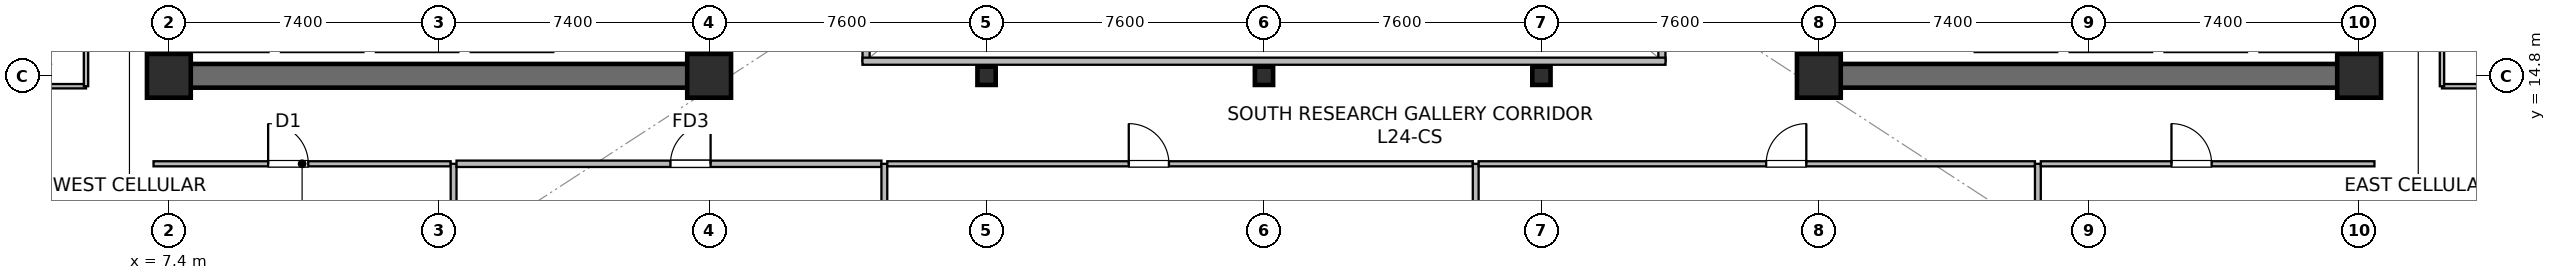
"""IFC4 building model, lengths in metres.
Left out: names, types, materials, properties, quantities, classifications, styles, units other than length and angle.
Written with IfcOpenShell. Run it as: python <this file> out.ifc"""

import sys

from ifc_helpers import new_model, si_unit, direction, frame, frame_2d, origin, origin_2d, place, context, subcontext, project, spatial, rectangle, hollow_rectangle, extrude, source, transform, mapped, element, fill, save


model = new_model("IFC4")
c1 = context("Model", 3, precision=1e-05, world=origin(), true_north=direction((0.0, 1.0)))
c2 = subcontext(c1, "Body", "Model", "MODEL_VIEW")
j1 = project(units=[si_unit("LENGTHUNIT", "METRE"), si_unit("PLANEANGLEUNIT", "RADIAN")], contexts=[c1])
p1 = place(None, origin())
s1 = spatial("IfcSite", under=j1, at=p1, CompositionType="ELEMENT")
p2 = place(p1, origin())
s2 = spatial("IfcBuilding", under=s1, at=p2, CompositionType="ELEMENT")
p3 = place(p2, frame((0.0, 0.0, 100.3)))
s3 = spatial("IfcBuildingStorey", under=s2, at=p3, CompositionType="ELEMENT", Elevation=100.3)
p4 = place(p3, frame((7.075, 14.8, 0.0), z_axis=(0.0, 0.0, 1.0), x_axis=(1.0, 0.0, 0.0)))
e1 = element("IfcWall", 1, at=p4, inside=s3, PredefinedType="SHEAR", context=c2, shape_type="SweptSolid", body=[
    extrude(rectangle(XDim=15.45, YDim=0.65, at=frame_2d((7.725, 0.0))), origin(), (0.0, 0.0, 1.0), 4.49),
])
p5 = place(p3, frame((7.4, 15.125, 0.0), z_axis=(0.0, 0.0, 1.0), x_axis=(0.0, 1.0, 0.0)))
e2 = element("IfcWall", 2, at=p5, inside=s3, PredefinedType="SHEAR", context=c2, shape_type="SweptSolid", body=[
    extrude(rectangle(XDim=18.35, YDim=0.65, at=frame_2d((9.175, 0.0))), origin(), (0.0, 0.0, 1.0), 4.49),
])
p6 = place(p3, frame((22.2, 15.125, 0.0), z_axis=(0.0, 0.0, 1.0), x_axis=(0.0, 1.0, 0.0)))
e3 = element("IfcWall", 3, at=p6, inside=s3, PredefinedType="SHEAR", context=c2, shape_type="SweptSolid", body=[
    extrude(rectangle(XDim=18.35, YDim=0.65, at=frame_2d((9.175, 0.0))), origin(), (0.0, 0.0, 1.0), 4.49),
])
p7 = place(p6, frame((3.425, 0.0, 0.0)))
e4 = element("IfcOpeningElement", 4, at=p7, cuts=e3, PredefinedType="OPENING", context=c2, shape_type="SweptSolid", body=[
    extrude(rectangle(XDim=1.42, YDim=2.2, at=frame_2d((0.71, 1.1))), frame((0.0, 0.335, 0.0), z_axis=(0.0, -1.0, 0.0), x_axis=(1.0, 0.0, 0.0)), (0.0, 0.0, 1.0), 0.67),
])
p8 = place(p3, frame((52.275, 14.8, 0.0), z_axis=(0.0, 0.0, 1.0), x_axis=(1.0, 0.0, 0.0)))
e5 = element("IfcWall", 5, at=p8, inside=s3, PredefinedType="SHEAR", context=c2, shape_type="SweptSolid", body=[
    extrude(rectangle(XDim=15.45, YDim=0.65, at=frame_2d((7.725, 0.0))), origin(), (0.0, 0.0, 1.0), 4.49),
])
p9 = place(p3, frame((52.6, 15.125, 0.0), z_axis=(0.0, 0.0, 1.0), x_axis=(0.0, 1.0, 0.0)))
e6 = element("IfcWall", 6, at=p9, inside=s3, PredefinedType="SHEAR", context=c2, shape_type="SweptSolid", body=[
    extrude(rectangle(XDim=18.35, YDim=0.65, at=frame_2d((9.175, 0.0))), origin(), (0.0, 0.0, 1.0), 4.49),
])
p10 = place(p9, frame((3.425, 0.0, 0.0)))
e7 = element("IfcOpeningElement", 7, at=p10, cuts=e6, PredefinedType="OPENING", context=c2, shape_type="SweptSolid", body=[
    extrude(rectangle(XDim=1.42, YDim=2.2, at=frame_2d((0.71, 1.1))), frame((0.0, 0.335, 0.0), z_axis=(0.0, -1.0, 0.0), x_axis=(1.0, 0.0, 0.0)), (0.0, 0.0, 1.0), 0.67),
])
p11 = place(p3, frame((67.4, 15.125, 0.0), z_axis=(0.0, 0.0, 1.0), x_axis=(0.0, 1.0, 0.0)))
e8 = element("IfcWall", 8, at=p11, inside=s3, PredefinedType="SHEAR", context=c2, shape_type="SweptSolid", body=[
    extrude(rectangle(XDim=18.35, YDim=0.65, at=frame_2d((9.175, 0.0))), origin(), (0.0, 0.0, 1.0), 4.49),
])
m1 = source(origin(), c2, "Body", "SweptSolid", [
    extrude(rectangle(XDim=1.2, YDim=1.2, at=origin_2d()), origin(), (0.0, 0.0, 1.0), 4.8),
])
for number, where, z_axis, x_axis in (
    (9, (7.4, 14.8, 0.0), (0.0, 0.0, 1.0), (1.0, 0.0, 0.0)),
    (10, (22.2, 14.8, 0.0), (0.0, 0.0, 1.0), (1.0, 0.0, 0.0)),
    (11, (52.6, 14.8, 0.0), (0.0, 0.0, 1.0), (1.0, 0.0, 0.0)),
    (12, (67.4, 14.8, 0.0), (0.0, 0.0, 1.0), (1.0, 0.0, 0.0)),
):
    element("IfcColumn", number, at=place(p3, frame(where, z_axis=z_axis, x_axis=x_axis)), inside=s3, PredefinedType="COLUMN", context=c2, shape_type="MappedRepresentation", body=[
        mapped(m1, transform((0.0, 0.0, 0.0), scale=1.0)),
    ])
m2 = source(origin(), c2, "Body", "SweptSolid", [
    extrude(hollow_rectangle(XDim=0.5, YDim=0.5, WallThickness=0.022, at=origin_2d()), origin(), (0.0, 0.0, 1.0), 4.8),
])
for number, where, z_axis, x_axis in (
    (13, (29.8, 14.8, 0.0), (0.0, 0.0, 1.0), (1.0, 0.0, 0.0)),
    (14, (37.4, 14.8, 0.0), (0.0, 0.0, 1.0), (1.0, 0.0, 0.0)),
    (15, (45.0, 14.8, 0.0), (0.0, 0.0, 1.0), (1.0, 0.0, 0.0)),
):
    element("IfcColumn", number, at=place(p3, frame(where, z_axis=z_axis, x_axis=x_axis)), inside=s3, PredefinedType="COLUMN", context=c2, shape_type="MappedRepresentation", body=[
        mapped(m2, transform((0.0, 0.0, 0.0), scale=1.0)),
    ])
p12 = place(p3, frame((7.87, 15.55, 0.0), z_axis=(0.0, 0.0, 1.0), x_axis=(1.0, 0.0, 0.0)))
e16 = element("IfcWall", 16, at=p12, inside=s3, PredefinedType="SOLIDWALL", context=c2, shape_type="SweptSolid", body=[
    extrude(rectangle(XDim=2.26, YDim=0.2, at=frame_2d((1.13, 0.0))), origin(), (0.0, 0.0, 1.0), 4.49),
])
p13 = place(p3, frame((10.47, 15.55, 0.0), z_axis=(0.0, 0.0, 1.0), x_axis=(1.0, 0.0, 0.0)))
e17 = element("IfcWall", 17, at=p13, inside=s3, PredefinedType="SOLIDWALL", context=c2, shape_type="SweptSolid", body=[
    extrude(rectangle(XDim=2.26, YDim=0.2, at=frame_2d((1.13, 0.0))), origin(), (0.0, 0.0, 1.0), 4.49),
])
p14 = place(p3, frame((13.07, 15.55, 0.0), z_axis=(0.0, 0.0, 1.0), x_axis=(1.0, 0.0, 0.0)))
e18 = element("IfcWall", 18, at=p14, inside=s3, PredefinedType="SOLIDWALL", context=c2, shape_type="SweptSolid", body=[
    extrude(rectangle(XDim=2.26, YDim=0.2, at=frame_2d((1.13, 0.0))), origin(), (0.0, 0.0, 1.0), 3.825),
])
for number, where, z_axis, x_axis in (
    (19, (15.67, 15.55, 0.0), (0.0, 0.0, 1.0), (1.0, 0.0, 0.0)),
    (20, (64.67, 15.55, 0.0), (0.0, 0.0, 1.0), (1.0, 0.0, 0.0)),
    (21, (62.07, 15.55, 0.0), (0.0, 0.0, 1.0), (1.0, 0.0, 0.0)),
):
    element("IfcWall", number, at=place(p3, frame(where, z_axis=z_axis, x_axis=x_axis)), inside=s3, PredefinedType="SOLIDWALL", context=c2, shape_type="SweptSolid", body=[
        extrude(rectangle(XDim=2.26, YDim=0.2, at=frame_2d((1.13, 0.0))), origin(), (0.0, 0.0, 1.0), 4.49),
    ])
p15 = place(p3, frame((59.47, 15.55, 0.0), z_axis=(0.0, 0.0, 1.0), x_axis=(1.0, 0.0, 0.0)))
e22 = element("IfcWall", 22, at=p15, inside=s3, PredefinedType="SOLIDWALL", context=c2, shape_type="SweptSolid", body=[
    extrude(rectangle(XDim=2.26, YDim=0.2, at=frame_2d((1.13, 0.0))), origin(), (0.0, 0.0, 1.0), 3.825),
])
p16 = place(p3, frame((56.87, 15.55, 0.0), z_axis=(0.0, 0.0, 1.0), x_axis=(1.0, 0.0, 0.0)))
e23 = element("IfcWall", 23, at=p16, inside=s3, PredefinedType="SOLIDWALL", context=c2, shape_type="SweptSolid", body=[
    extrude(rectangle(XDim=2.26, YDim=0.2, at=frame_2d((1.13, 0.0))), origin(), (0.0, 0.0, 1.0), 4.49),
])
p17 = place(p3, frame((26.5, 15.2, 0.0), z_axis=(0.0, 0.0, 1.0), x_axis=(0.0, 1.0, 0.0)))
e24 = element("IfcWall", 24, at=p17, inside=s3, PredefinedType="SOLIDWALL", context=c2, shape_type="SweptSolid", body=[
    extrude(rectangle(XDim=18.2, YDim=0.195, at=frame_2d((9.1, 0.0))), origin(), (0.0, 0.0, 1.0), 4.49),
])
p18 = place(p17, frame((1.8, 0.0, 0.9)))
e25 = element("IfcOpeningElement", 25, at=p18, cuts=e24, PredefinedType="OPENING", context=c2, shape_type="SweptSolid", body=[
    extrude(rectangle(XDim=1.5, YDim=1.4, at=frame_2d((0.75, 0.7))), frame((0.0, 0.107, 0.0), z_axis=(0.0, -1.0, 0.0), x_axis=(1.0, 0.0, 0.0)), (0.0, 0.0, 1.0), 0.215),
])
p19 = place(p17, frame((13.2, 0.0, 0.9)))
e26 = element("IfcOpeningElement", 26, at=p19, cuts=e24, PredefinedType="OPENING", context=c2, shape_type="SweptSolid", body=[
    extrude(rectangle(XDim=1.5, YDim=1.4, at=frame_2d((0.75, 0.7))), frame((0.0, 0.107, 0.0), z_axis=(0.0, -1.0, 0.0), x_axis=(1.0, 0.0, 0.0)), (0.0, 0.0, 1.0), 0.215),
])
p20 = place(p3, frame((48.3, 15.2, 0.0), z_axis=(0.0, 0.0, 1.0), x_axis=(0.0, 1.0, 0.0)))
e27 = element("IfcWall", 27, at=p20, inside=s3, PredefinedType="SOLIDWALL", context=c2, shape_type="SweptSolid", body=[
    extrude(rectangle(XDim=18.2, YDim=0.195, at=frame_2d((9.1, 0.0))), origin(), (0.0, 0.0, 1.0), 4.49),
])
p21 = place(p20, frame((1.8, 0.0, 0.9)))
e28 = element("IfcOpeningElement", 28, at=p21, cuts=e27, PredefinedType="OPENING", context=c2, shape_type="SweptSolid", body=[
    extrude(rectangle(XDim=1.5, YDim=1.4, at=frame_2d((0.75, 0.7))), frame((0.0, 0.107, 0.0), z_axis=(0.0, -1.0, 0.0), x_axis=(1.0, 0.0, 0.0)), (0.0, 0.0, 1.0), 0.215),
])
p22 = place(p20, frame((13.2, 0.0, 0.9)))
e29 = element("IfcOpeningElement", 29, at=p22, cuts=e27, PredefinedType="OPENING", context=c2, shape_type="SweptSolid", body=[
    extrude(rectangle(XDim=1.5, YDim=1.4, at=frame_2d((0.75, 0.7))), frame((0.0, 0.107, 0.0), z_axis=(0.0, -1.0, 0.0), x_axis=(1.0, 0.0, 0.0)), (0.0, 0.0, 1.0), 0.215),
])
p23 = place(p3, frame((26.4, 15.2, 0.0), z_axis=(0.0, 0.0, 1.0), x_axis=(1.0, 0.0, 0.0)))
e30 = element("IfcWall", 30, at=p23, inside=s3, PredefinedType="SOLIDWALL", context=c2, shape_type="SweptSolid", body=[
    extrude(rectangle(XDim=22.0, YDim=0.195, at=frame_2d((11.0, 0.0))), origin(), (0.0, 0.0, 1.0), 4.49),
])
p24 = place(p3, frame((6.98, 12.39, 0.0), z_axis=(0.0, 0.0, 1.0), x_axis=(1.0, 0.0, 0.0)))
e31 = element("IfcWall", 31, at=p24, inside=s3, PredefinedType="PARTITIONING", context=c2, shape_type="SweptSolid", body=[
    extrude(rectangle(XDim=8.14, YDim=0.14, at=frame_2d((4.07, 0.0))), origin(), (0.0, 0.0, 1.0), 3.825),
])
p25 = place(p24, frame((3.14, 0.0, 0.0)))
e32 = element("IfcOpeningElement", 32, at=p25, cuts=e31, PredefinedType="OPENING", context=c2, shape_type="SweptSolid", body=[
    extrude(rectangle(XDim=1.1, YDim=2.18, at=frame_2d((0.55, 1.09))), frame((0.0, 0.08, 0.0), z_axis=(0.0, -1.0, 0.0), x_axis=(1.0, 0.0, 0.0)), (0.0, 0.0, 1.0), 0.16),
])
p26 = place(p3, frame((15.2, 1.41, 0.0), z_axis=(0.0, 0.0, 1.0), x_axis=(0.0, 1.0, 0.0)))
e33 = element("IfcWall", 33, at=p26, inside=s3, PredefinedType="PARTITIONING", context=c2, shape_type="SweptSolid", body=[
    extrude(rectangle(XDim=10.98, YDim=0.16, at=frame_2d((5.49, 0.0))), origin(), (0.0, 0.0, 1.0), 3.775),
])
p27 = place(p3, frame((15.28, 12.39, 0.0), z_axis=(0.0, 0.0, 1.0), x_axis=(1.0, 0.0, 0.0)))
e34 = element("IfcWall", 34, at=p27, inside=s3, PredefinedType="PARTITIONING", context=c2, shape_type="SweptSolid", body=[
    extrude(rectangle(XDim=11.64, YDim=0.175, at=frame_2d((5.82, 0.0))), origin(), (0.0, 0.0, 1.0), 3.825),
])
p28 = place(p27, frame((5.86, 0.0, 0.0)))
e35 = element("IfcOpeningElement", 35, at=p28, cuts=e34, PredefinedType="OPENING", context=c2, shape_type="SweptSolid", body=[
    extrude(rectangle(XDim=1.1, YDim=2.15, at=frame_2d((0.55, 1.075))), frame((0.0, 0.098, 0.0), z_axis=(0.0, -1.0, 0.0), x_axis=(1.0, 0.0, 0.0)), (0.0, 0.0, 1.0), 0.195),
])
p29 = place(p3, frame((27.0, 2.61, 0.0), z_axis=(0.0, 0.0, 1.0), x_axis=(0.0, 1.0, 0.0)))
e36 = element("IfcWall", 36, at=p29, inside=s3, PredefinedType="PARTITIONING", context=c2, shape_type="SweptSolid", body=[
    extrude(rectangle(XDim=9.78, YDim=0.16, at=frame_2d((4.89, 0.0))), origin(), (0.0, 0.0, 1.0), 3.775),
])
p30 = place(p3, frame((27.08, 12.39, 0.0), z_axis=(0.0, 0.0, 1.0), x_axis=(1.0, 0.0, 0.0)))
e37 = element("IfcWall", 37, at=p30, inside=s3, PredefinedType="PARTITIONING", context=c2, shape_type="SweptSolid", body=[
    extrude(rectangle(XDim=16.04, YDim=0.14, at=frame_2d((8.02, 0.0))), origin(), (0.0, 0.0, 1.0), 3.825),
])
p31 = place(p30, frame((6.615, 0.0, 0.0)))
e38 = element("IfcOpeningElement", 38, at=p31, cuts=e37, PredefinedType="OPENING", context=c2, shape_type="SweptSolid", body=[
    extrude(rectangle(XDim=1.1, YDim=2.18, at=frame_2d((0.55, 1.09))), frame((0.0, 0.08, 0.0), z_axis=(0.0, -1.0, 0.0), x_axis=(1.0, 0.0, 0.0)), (0.0, 0.0, 1.0), 0.16),
])
p32 = place(p3, frame((43.2, 2.61, 0.0), z_axis=(0.0, 0.0, 1.0), x_axis=(0.0, 1.0, 0.0)))
e39 = element("IfcWall", 39, at=p32, inside=s3, PredefinedType="PARTITIONING", context=c2, shape_type="SweptSolid", body=[
    extrude(rectangle(XDim=9.78, YDim=0.16, at=frame_2d((4.89, 0.0))), origin(), (0.0, 0.0, 1.0), 3.775),
])
p33 = place(p3, frame((43.28, 12.39, 0.0), z_axis=(0.0, 0.0, 1.0), x_axis=(1.0, 0.0, 0.0)))
e40 = element("IfcWall", 40, at=p33, inside=s3, PredefinedType="PARTITIONING", context=c2, shape_type="SweptSolid", body=[
    extrude(rectangle(XDim=15.24, YDim=0.14, at=frame_2d((7.62, 0.0))), origin(), (0.0, 0.0, 1.0), 3.825),
])
p34 = place(p33, frame((7.876, 0.0, 0.0)))
e41 = element("IfcOpeningElement", 41, at=p34, cuts=e40, PredefinedType="OPENING", context=c2, shape_type="SweptSolid", body=[
    extrude(rectangle(XDim=1.1, YDim=2.18, at=frame_2d((0.55, 1.09))), frame((0.0, 0.08, 0.0), z_axis=(0.0, -1.0, 0.0), x_axis=(1.0, 0.0, 0.0)), (0.0, 0.0, 1.0), 0.16),
])
p35 = place(p3, frame((58.6, 1.41, 0.0), z_axis=(0.0, 0.0, 1.0), x_axis=(0.0, 1.0, 0.0)))
e42 = element("IfcWall", 42, at=p35, inside=s3, PredefinedType="PARTITIONING", context=c2, shape_type="SweptSolid", body=[
    extrude(rectangle(XDim=10.98, YDim=0.16, at=frame_2d((5.49, 0.0))), origin(), (0.0, 0.0, 1.0), 3.775),
])
p36 = place(p3, frame((58.68, 12.39, 0.0), z_axis=(0.0, 0.0, 1.0), x_axis=(1.0, 0.0, 0.0)))
e43 = element("IfcWall", 43, at=p36, inside=s3, PredefinedType="PARTITIONING", context=c2, shape_type="SweptSolid", body=[
    extrude(rectangle(XDim=9.14, YDim=0.14, at=frame_2d((4.57, 0.0))), origin(), (0.0, 0.0, 1.0), 3.825),
])
p37 = place(p36, frame((3.58, 0.0, 0.0)))
e44 = element("IfcOpeningElement", 44, at=p37, cuts=e43, PredefinedType="OPENING", context=c2, shape_type="SweptSolid", body=[
    extrude(rectangle(XDim=1.1, YDim=2.18, at=frame_2d((0.55, 1.09))), frame((0.0, 0.08, 0.0), z_axis=(0.0, -1.0, 0.0), x_axis=(1.0, 0.0, 0.0)), (0.0, 0.0, 1.0), 0.16),
])
p38 = place(p3, frame((2.11, 14.515, 0.0), z_axis=(0.0, 0.0, 1.0), x_axis=(1.0, 0.0, 0.0)))
e45 = element("IfcWall", 45, at=p38, inside=s3, PredefinedType="PARTITIONING", context=c2, shape_type="SweptSolid", body=[
    extrude(rectangle(XDim=3.02, YDim=0.12, at=frame_2d((1.51, 0.0))), origin(), (0.0, 0.0, 1.0), 4.49),
])
p39 = place(p3, frame((5.13, 14.515, 0.0), z_axis=(0.0, 0.0, 1.0), x_axis=(0.0, 1.0, 0.0)))
e46 = element("IfcWall", 46, at=p39, inside=s3, PredefinedType="PARTITIONING", context=c2, shape_type="SweptSolid", body=[
    extrude(rectangle(XDim=11.625, YDim=0.12, at=frame_2d((5.812, 0.0))), origin(), (0.0, 0.0, 1.0), 4.49),
])
p40 = place(p39, frame((5.363, 0.0, 0.0)))
e47 = element("IfcOpeningElement", 47, at=p40, cuts=e46, PredefinedType="OPENING", context=c2, shape_type="SweptSolid", body=[
    extrude(rectangle(XDim=0.9, YDim=2.1, at=frame_2d((0.45, 1.05))), frame((0.0, 0.07, 0.0), z_axis=(0.0, -1.0, 0.0), x_axis=(1.0, 0.0, 0.0)), (0.0, 0.0, 1.0), 0.14),
])
p41 = place(p3, frame((69.67, 14.515, 0.0), z_axis=(0.0, 0.0, 1.0), x_axis=(1.0, 0.0, 0.0)))
e48 = element("IfcWall", 48, at=p41, inside=s3, PredefinedType="PARTITIONING", context=c2, shape_type="SweptSolid", body=[
    extrude(rectangle(XDim=3.02, YDim=0.12, at=frame_2d((1.51, 0.0))), origin(), (0.0, 0.0, 1.0), 4.49),
])
p42 = place(p3, frame((69.67, 14.515, 0.0), z_axis=(0.0, 0.0, 1.0), x_axis=(0.0, 1.0, 0.0)))
e49 = element("IfcWall", 49, at=p42, inside=s3, PredefinedType="PARTITIONING", context=c2, shape_type="SweptSolid", body=[
    extrude(rectangle(XDim=4.825, YDim=0.12, at=frame_2d((2.413, 0.0))), origin(), (0.0, 0.0, 1.0), 4.49),
])
p43 = place(p42, frame((1.962, 0.0, 0.0)))
e50 = element("IfcOpeningElement", 50, at=p43, cuts=e49, PredefinedType="OPENING", context=c2, shape_type="SweptSolid", body=[
    extrude(rectangle(XDim=0.9, YDim=2.1, at=frame_2d((0.45, 1.05))), frame((0.0, 0.07, 0.0), z_axis=(0.0, -1.0, 0.0), x_axis=(1.0, 0.0, 0.0)), (0.0, 0.0, 1.0), 0.14),
])
m3 = source(origin(), c2, "Body", "SweptSolid", [
    extrude(rectangle(XDim=1.1, YDim=2.18, at=frame_2d((0.55, 1.09))), frame((0.0, 0.025, 0.0), z_axis=(0.0, -1.0, 0.0), x_axis=(1.0, 0.0, 0.0)), (0.0, 0.0, 1.0), 0.05),
])
p44 = place(p25, origin())
e51 = element("IfcDoor", 51, at=p44, inside=s3, OperationType="SINGLE_SWING_LEFT", PredefinedType="DOOR", context=c2, shape_type="MappedRepresentation", body=[
    mapped(m3, transform((0.0, 0.0, 0.0), scale=1.0)),
])
fill(e32, e51)
m4 = source(origin(), c2, "Body", "SweptSolid", [
    extrude(rectangle(XDim=1.1, YDim=2.15, at=frame_2d((0.55, 1.075))), frame((0.0, 0.025, 0.0), z_axis=(0.0, -1.0, 0.0), x_axis=(1.0, 0.0, 0.0)), (0.0, 0.0, 1.0), 0.05),
])
p45 = place(p28, origin())
e52 = element("IfcDoor", 52, at=p45, inside=s3, OperationType="SINGLE_SWING_RIGHT", PredefinedType="DOOR", context=c2, shape_type="MappedRepresentation", body=[
    mapped(m4, transform((0.0, 0.0, 0.0), scale=1.0)),
])
fill(e35, e52)
p46 = place(p31, origin())
e53 = element("IfcDoor", 53, at=p46, inside=s3, OperationType="SINGLE_SWING_LEFT", PredefinedType="DOOR", context=c2, shape_type="MappedRepresentation", body=[
    mapped(m3, transform((0.0, 0.0, 0.0), scale=1.0)),
])
fill(e38, e53)
p47 = place(p34, origin())
e54 = element("IfcDoor", 54, at=p47, inside=s3, OperationType="SINGLE_SWING_RIGHT", PredefinedType="DOOR", context=c2, shape_type="MappedRepresentation", body=[
    mapped(m3, transform((0.0, 0.0, 0.0), scale=1.0)),
])
fill(e41, e54)
p48 = place(p37, origin())
e55 = element("IfcDoor", 55, at=p48, inside=s3, OperationType="SINGLE_SWING_LEFT", PredefinedType="DOOR", context=c2, shape_type="MappedRepresentation", body=[
    mapped(m3, transform((0.0, 0.0, 0.0), scale=1.0)),
])
fill(e44, e55)
save(model, sys.argv[1])
